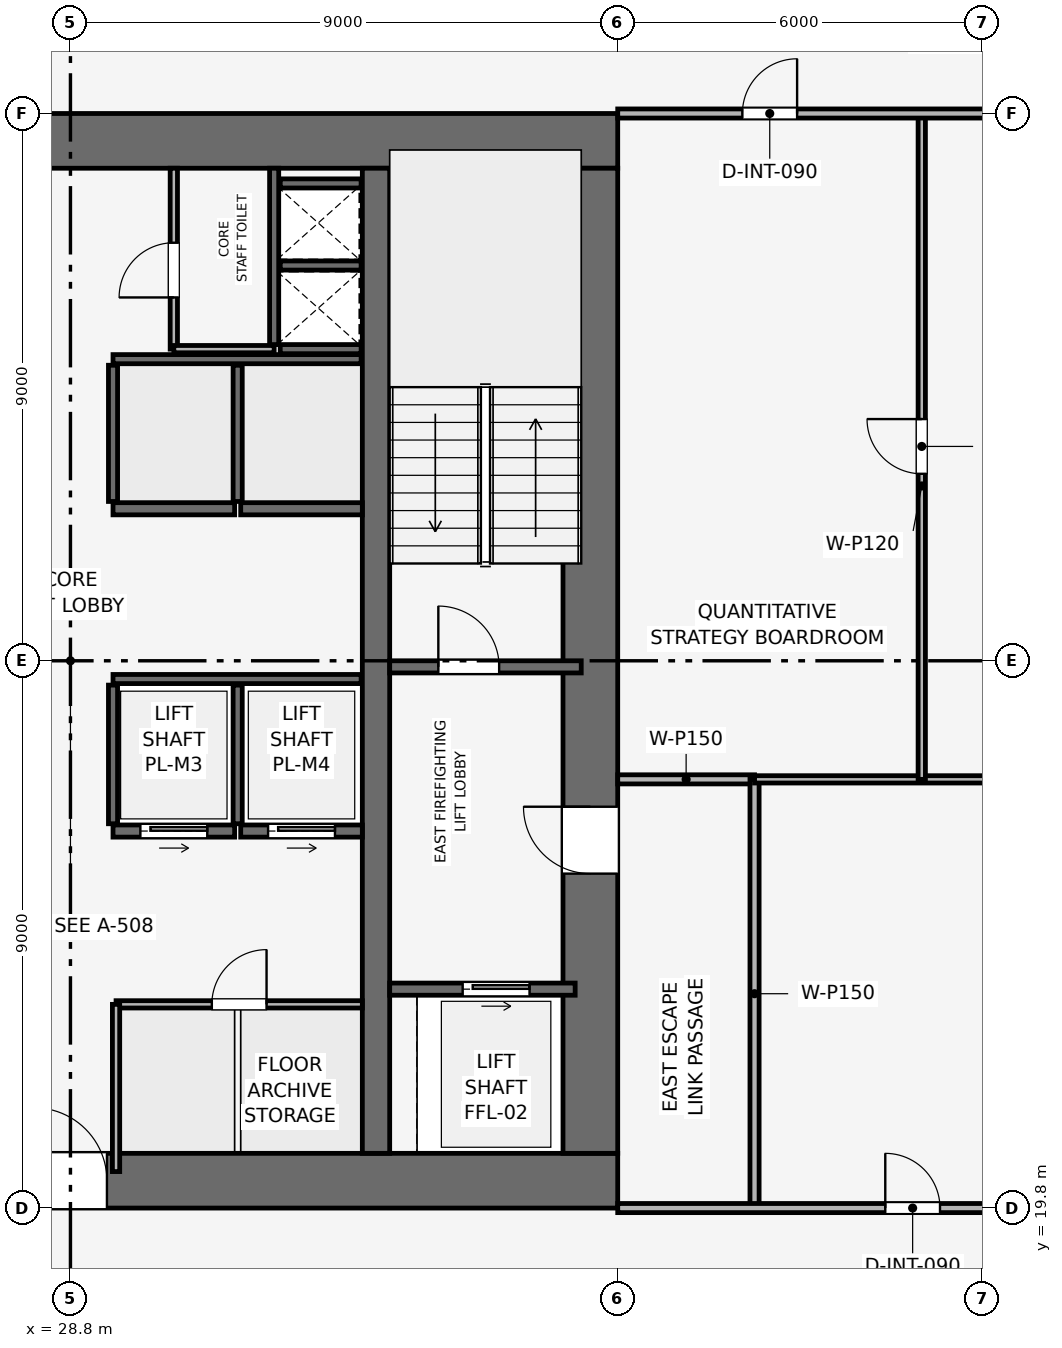
"""IFC4 building model, lengths in metres.
Left out: names, types, materials, properties, quantities, classifications, styles, units other than length and angle.
Written with IfcOpenShell. Run it as: python <this file> out.ifc"""

import sys

from ifc_helpers import new_model, si_unit, direction, frame, frame_2d, origin, place, context, subcontext, project, spatial, rectangle, extrude, element, fill, save


model = new_model("IFC4")
c1 = context("Model", 3, precision=1e-05, world=origin(), true_north=direction((0.0, 1.0)))
c2 = subcontext(c1, "Body", "Model", "MODEL_VIEW")
j1 = project(units=[si_unit("LENGTHUNIT", "METRE"), si_unit("PLANEANGLEUNIT", "RADIAN")], contexts=[c1])
p1 = place(None, origin())
s1 = spatial("IfcSite", under=j1, at=p1, CompositionType="ELEMENT")
p2 = place(p1, origin())
s2 = spatial("IfcBuilding", under=s1, at=p2, CompositionType="ELEMENT")
p3 = place(p2, frame((0.0, 0.0, 172.05)))
s3 = spatial("IfcBuildingStorey", under=s2, at=p3, CompositionType="ELEMENT", Elevation=172.05)
p4 = place(p3, frame((19.8, 20.25, 0.0), z_axis=(0.0, 0.0, 1.0), x_axis=(1.0, 0.0, 0.0)))
e1 = element("IfcWall", 1, at=p4, inside=s3, PredefinedType="SHEAR", context=c2, shape_type="SweptSolid", body=[
    extrude(rectangle(XDim=18.0, YDim=0.9, at=frame_2d((9.0, 0.0))), origin(), (0.0, 0.0, 1.0), 3.75),
])
p5 = place(p4, frame((8.4, 0.0, 0.0)))
e2 = element("IfcOpeningElement", 2, at=p5, cuts=e1, PredefinedType="OPENING", context=c2, shape_type="SweptSolid", body=[
    extrude(rectangle(XDim=1.2, YDim=2.2, at=frame_2d((0.6, 1.1))), frame((0.0, 0.46, 0.0), z_axis=(0.0, -1.0, 0.0), x_axis=(1.0, 0.0, 0.0)), (0.0, 0.0, 1.0), 0.92),
])
p6 = place(p3, frame((19.8, 37.35, 0.0), z_axis=(0.0, 0.0, 1.0), x_axis=(1.0, 0.0, 0.0)))
e3 = element("IfcWall", 3, at=p6, inside=s3, PredefinedType="SHEAR", context=c2, shape_type="SweptSolid", body=[
    extrude(rectangle(XDim=18.0, YDim=0.9, at=frame_2d((9.0, 0.0))), origin(), (0.0, 0.0, 1.0), 3.75),
])
p7 = place(p6, frame((7.05, 0.0, 0.0)))
e4 = element("IfcOpeningElement", 4, at=p7, cuts=e3, PredefinedType="OPENING", context=c2, shape_type="SweptSolid", body=[
    extrude(rectangle(XDim=1.1, YDim=2.15, at=frame_2d((0.55, 1.075))), frame((0.0, 0.46, 0.0), z_axis=(0.0, -1.0, 0.0), x_axis=(1.0, 0.0, 0.0)), (0.0, 0.0, 1.0), 0.92),
])
p8 = place(p3, frame((37.35, 20.7, 0.0), z_axis=(0.0, 0.0, 1.0), x_axis=(0.0, 1.0, 0.0)))
e5 = element("IfcWall", 5, at=p8, inside=s3, PredefinedType="SHEAR", context=c2, shape_type="SweptSolid", body=[
    extrude(rectangle(XDim=16.2, YDim=0.9, at=frame_2d((8.1, 0.0))), origin(), (0.0, 0.0, 1.0), 3.75),
])
p9 = place(p8, frame((4.6, 0.0, 0.0)))
e6 = element("IfcOpeningElement", 6, at=p9, cuts=e5, PredefinedType="OPENING", context=c2, shape_type="SweptSolid", body=[
    extrude(rectangle(XDim=1.1, YDim=2.15, at=frame_2d((0.55, 1.075))), frame((0.0, 0.46, 0.0), z_axis=(0.0, -1.0, 0.0), x_axis=(1.0, 0.0, 0.0)), (0.0, 0.0, 1.0), 0.92),
])
p10 = place(p3, frame((33.825, 20.7, 0.0), z_axis=(0.0, 0.0, 1.0), x_axis=(0.0, 1.0, 0.0)))
e7 = element("IfcWall", 7, at=p10, inside=s3, PredefinedType="SHEAR", context=c2, shape_type="SweptSolid", body=[
    extrude(rectangle(XDim=16.2, YDim=0.45, at=frame_2d((8.1, 0.0))), origin(), (0.0, 0.0, 1.0), 3.75),
])
p11 = place(p3, frame((34.05, 28.7, 0.0), z_axis=(0.0, 0.0, 1.0), x_axis=(1.0, 0.0, 0.0)))
e8 = element("IfcWall", 8, at=p11, inside=s3, PredefinedType="SHEAR", context=c2, shape_type="SweptSolid", body=[
    extrude(rectangle(XDim=3.15, YDim=0.2, at=frame_2d((1.575, 0.0))), origin(), (0.0, 0.0, 1.0), 3.495),
])
p12 = place(p11, frame((0.8, 0.0, 0.0)))
e9 = element("IfcOpeningElement", 9, at=p12, cuts=e8, PredefinedType="OPENING", context=c2, shape_type="SweptSolid", body=[
    extrude(rectangle(XDim=1.0, YDim=2.1, at=frame_2d((0.5, 1.05))), frame((0.0, 0.11, 0.0), z_axis=(0.0, -1.0, 0.0), x_axis=(1.0, 0.0, 0.0)), (0.0, 0.0, 1.0), 0.22),
])
p13 = place(p3, frame((32.15, 34.0, 0.0), z_axis=(0.0, 0.0, 1.0), x_axis=(0.0, 1.0, 0.0)))
e10 = element("IfcWall", 10, at=p13, inside=s3, PredefinedType="SHEAR", context=c2, shape_type="SweptSolid", body=[
    extrude(rectangle(XDim=2.9, YDim=0.15, at=frame_2d((1.45, 0.0))), origin(), (0.0, 0.0, 1.0), 3.495),
])
for number, where, z_axis, x_axis in (
    (11, (32.25, 33.925, 0.0), (0.0, 0.0, 1.0), (1.0, 0.0, 0.0)),
    (12, (32.25, 35.3, 0.0), (0.0, 0.0, 1.0), (1.0, 0.0, 0.0)),
):
    element("IfcWall", number, at=place(p3, frame(where, z_axis=z_axis, x_axis=x_axis)), inside=s3, PredefinedType="SHEAR", context=c2, shape_type="SweptSolid", body=[
        extrude(rectangle(XDim=1.33, YDim=0.15, at=frame_2d((0.665, 0.0))), origin(), (0.0, 0.0, 1.0), 3.495),
    ])
p14 = place(p3, frame((34.05, 23.4, 0.0), z_axis=(0.0, 0.0, 1.0), x_axis=(1.0, 0.0, 0.0)))
e13 = element("IfcWall", 13, at=p14, inside=s3, PredefinedType="SHEAR", context=c2, shape_type="SweptSolid", body=[
    extrude(rectangle(XDim=3.05, YDim=0.2, at=frame_2d((1.525, 0.0))), origin(), (0.0, 0.0, 1.0), 3.495),
])
p15 = place(p14, frame((1.2, 0.0, 0.0)))
e14 = element("IfcOpeningElement", 14, at=p15, cuts=e13, PredefinedType="OPENING", context=c2, shape_type="SweptSolid", body=[
    extrude(rectangle(XDim=1.1, YDim=2.15, at=frame_2d((0.55, 1.075))), frame((0.0, 0.11, 0.0), z_axis=(0.0, -1.0, 0.0), x_axis=(1.0, 0.0, 0.0)), (0.0, 0.0, 1.0), 0.22),
])
p16 = place(p3, frame((29.5, 26.0, 0.0), z_axis=(0.0, 0.0, 1.0), x_axis=(1.0, 0.0, 0.0)))
e15 = element("IfcWall", 15, at=p16, inside=s3, PredefinedType="SHEAR", context=c2, shape_type="SweptSolid", body=[
    extrude(rectangle(XDim=2.0, YDim=0.2, at=frame_2d((1.0, 0.0))), origin(), (0.0, 0.0, 1.0), 3.495),
])
p17 = place(p16, frame((0.45, 0.0, 0.0)))
e16 = element("IfcOpeningElement", 16, at=p17, cuts=e15, PredefinedType="OPENING", context=c2, shape_type="SweptSolid", body=[
    extrude(rectangle(XDim=1.1, YDim=2.15, at=frame_2d((0.55, 1.075))), frame((0.0, 0.11, 0.0), z_axis=(0.0, -1.0, 0.0), x_axis=(1.0, 0.0, 0.0)), (0.0, 0.0, 1.0), 0.22),
])
p18 = place(p3, frame((31.6, 26.0, 0.0), z_axis=(0.0, 0.0, 1.0), x_axis=(1.0, 0.0, 0.0)))
e17 = element("IfcWall", 17, at=p18, inside=s3, PredefinedType="SHEAR", context=c2, shape_type="SweptSolid", body=[
    extrude(rectangle(XDim=2.0, YDim=0.2, at=frame_2d((1.0, 0.0))), origin(), (0.0, 0.0, 1.0), 3.495),
])
p19 = place(p18, frame((0.45, 0.0, 0.0)))
e18 = element("IfcOpeningElement", 18, at=p19, cuts=e17, PredefinedType="OPENING", context=c2, shape_type="SweptSolid", body=[
    extrude(rectangle(XDim=1.1, YDim=2.15, at=frame_2d((0.55, 1.075))), frame((0.0, 0.11, 0.0), z_axis=(0.0, -1.0, 0.0), x_axis=(1.0, 0.0, 0.0)), (0.0, 0.0, 1.0), 0.22),
])
for number, where, z_axis, x_axis in (
    (19, (29.5, 31.3, 0.0), (0.0, 0.0, 1.0), (1.0, 0.0, 0.0)),
    (20, (31.6, 31.3, 0.0), (0.0, 0.0, 1.0), (1.0, 0.0, 0.0)),
):
    element("IfcWall", number, at=place(p3, frame(where, z_axis=z_axis, x_axis=x_axis)), inside=s3, PredefinedType="SHEAR", context=c2, shape_type="SweptSolid", body=[
        extrude(rectangle(XDim=2.0, YDim=0.2, at=frame_2d((1.0, 0.0))), origin(), (0.0, 0.0, 1.0), 3.495),
    ])
p20 = place(p3, frame((32.25, 36.65, 0.0), z_axis=(0.0, 0.0, 1.0), x_axis=(1.0, 0.0, 0.0)))
e21 = element("IfcWall", 21, at=p20, inside=s3, PredefinedType="SHEAR", context=c2, shape_type="SweptSolid", body=[
    extrude(rectangle(XDim=1.33, YDim=0.15, at=frame_2d((0.665, 0.0))), origin(), (0.0, 0.0, 1.0), 3.495),
])
p21 = place(p3, frame((29.5, 28.5, 0.0), z_axis=(0.0, 0.0, 1.0), x_axis=(1.0, 0.0, 0.0)))
e22 = element("IfcWall", 22, at=p21, inside=s3, PredefinedType="SHEAR", context=c2, shape_type="SweptSolid", body=[
    extrude(rectangle(XDim=4.08, YDim=0.15, at=frame_2d((2.04, 0.0))), origin(), (0.0, 0.0, 1.0), 3.495),
])
for number, where, z_axis, x_axis in (
    (23, (29.5, 26.12, 0.0), (0.0, 0.0, 1.0), (0.0, 1.0, 0.0)),
    (24, (31.55, 26.12, 0.0), (0.0, 0.0, 1.0), (0.0, 1.0, 0.0)),
):
    element("IfcWall", number, at=place(p3, frame(where, z_axis=z_axis, x_axis=x_axis)), inside=s3, PredefinedType="SHEAR", context=c2, shape_type="SweptSolid", body=[
        extrude(rectangle(XDim=2.28, YDim=0.15, at=frame_2d((1.14, 0.0))), origin(), (0.0, 0.0, 1.0), 3.495),
    ])
p22 = place(p3, frame((29.5, 33.76, 0.0), z_axis=(0.0, 0.0, 1.0), x_axis=(1.0, 0.0, 0.0)))
e25 = element("IfcWall", 25, at=p22, inside=s3, PredefinedType="SHEAR", context=c2, shape_type="SweptSolid", body=[
    extrude(rectangle(XDim=4.08, YDim=0.15, at=frame_2d((2.04, 0.0))), origin(), (0.0, 0.0, 1.0), 3.495),
])
for number, where, z_axis, x_axis in (
    (26, (29.5, 31.42, 0.0), (0.0, 0.0, 1.0), (0.0, 1.0, 0.0)),
    (27, (31.55, 31.42, 0.0), (0.0, 0.0, 1.0), (0.0, 1.0, 0.0)),
):
    element("IfcWall", number, at=place(p3, frame(where, z_axis=z_axis, x_axis=x_axis)), inside=s3, PredefinedType="SHEAR", context=c2, shape_type="SweptSolid", body=[
        extrude(rectangle(XDim=2.24, YDim=0.15, at=frame_2d((1.12, 0.0))), origin(), (0.0, 0.0, 1.0), 3.495),
    ])
p23 = place(p3, frame((30.5, 33.925, 0.0), z_axis=(0.0, 0.0, 1.0), x_axis=(0.0, 1.0, 0.0)))
e28 = element("IfcWall", 28, at=p23, inside=s3, PredefinedType="PARTITIONING", context=c2, shape_type="SweptSolid", body=[
    extrude(rectangle(XDim=2.975, YDim=0.12, at=frame_2d((1.487, 0.0))), origin(), (0.0, 0.0, 1.0), 3.495),
])
p24 = place(p23, frame((0.85, 0.0, 0.0)))
e29 = element("IfcOpeningElement", 29, at=p24, cuts=e28, PredefinedType="OPENING", context=c2, shape_type="SweptSolid", body=[
    extrude(rectangle(XDim=0.9, YDim=2.1, at=frame_2d((0.45, 1.05))), frame((0.0, 0.07, 0.0), z_axis=(0.0, -1.0, 0.0), x_axis=(1.0, 0.0, 0.0)), (0.0, 0.0, 1.0), 0.14),
])
p25 = place(p3, frame((30.5, 33.925, 0.0), z_axis=(0.0, 0.0, 1.0), x_axis=(1.0, 0.0, 0.0)))
e30 = element("IfcWall", 30, at=p25, inside=s3, PredefinedType="PARTITIONING", context=c2, shape_type="SweptSolid", body=[
    extrude(rectangle(XDim=1.65, YDim=0.12, at=frame_2d((0.825, 0.0))), origin(), (0.0, 0.0, 1.0), 3.495),
])
p26 = place(p3, frame((29.55, 23.15, 0.0), z_axis=(0.0, 0.0, 1.0), x_axis=(1.0, 0.0, 0.0)))
e31 = element("IfcWall", 31, at=p26, inside=s3, PredefinedType="PARTITIONING", context=c2, shape_type="SweptSolid", body=[
    extrude(rectangle(XDim=4.05, YDim=0.12, at=frame_2d((2.025, 0.0))), origin(), (0.0, 0.0, 1.0), 3.495),
])
p27 = place(p26, frame((1.575, 0.0, 0.0)))
e32 = element("IfcOpeningElement", 32, at=p27, cuts=e31, PredefinedType="OPENING", context=c2, shape_type="SweptSolid", body=[
    extrude(rectangle(XDim=0.9, YDim=2.1, at=frame_2d((0.45, 1.05))), frame((0.0, 0.07, 0.0), z_axis=(0.0, -1.0, 0.0), x_axis=(1.0, 0.0, 0.0)), (0.0, 0.0, 1.0), 0.14),
])
p28 = place(p3, frame((29.55, 20.4, 0.0), z_axis=(0.0, 0.0, 1.0), x_axis=(0.0, 1.0, 0.0)))
e33 = element("IfcWall", 33, at=p28, inside=s3, PredefinedType="PARTITIONING", context=c2, shape_type="SweptSolid", body=[
    extrude(rectangle(XDim=2.75, YDim=0.12, at=frame_2d((1.375, 0.0))), origin(), (0.0, 0.0, 1.0), 3.495),
])
p29 = place(p3, frame((37.8, 26.85, 0.0), z_axis=(0.0, 0.0, 1.0), x_axis=(1.0, 0.0, 0.0)))
e34 = element("IfcWall", 34, at=p29, inside=s3, PredefinedType="PARTITIONING", context=c2, shape_type="SweptSolid", body=[
    extrude(rectangle(XDim=2.25, YDim=0.15, at=frame_2d((1.125, 0.0))), origin(), (0.0, 0.0, 1.0), 3.495),
])
p30 = place(p3, frame((40.05, 19.8, 0.0), z_axis=(0.0, 0.0, 1.0), x_axis=(0.0, 1.0, 0.0)))
e35 = element("IfcWall", 35, at=p30, inside=s3, PredefinedType="PARTITIONING", context=c2, shape_type="SweptSolid", body=[
    extrude(rectangle(XDim=7.05, YDim=0.15, at=frame_2d((3.525, 0.0))), origin(), (0.0, 0.0, 1.0), 3.03),
])
p31 = place(p3, frame((40.05, 26.85, 0.0), z_axis=(0.0, 0.0, 1.0), x_axis=(1.0, 0.0, 0.0)))
e36 = element("IfcWall", 36, at=p31, inside=s3, PredefinedType="PARTITIONING", context=c2, shape_type="SweptSolid", body=[
    extrude(rectangle(XDim=12.92, YDim=0.12, at=frame_2d((6.46, 0.0))), origin(), (0.0, 0.0, 1.0), 2.98),
])
p32 = place(p3, frame((42.8, 26.85, 0.0), z_axis=(0.0, 0.0, 1.0), x_axis=(0.0, 1.0, 0.0)))
e37 = element("IfcWall", 37, at=p32, inside=s3, PredefinedType="PARTITIONING", context=c2, shape_type="SweptSolid", body=[
    extrude(rectangle(XDim=10.95, YDim=0.12, at=frame_2d((5.475, 0.0))), origin(), (0.0, 0.0, 1.0), 3.03),
])
p33 = place(p32, frame((5.025, 0.0, 0.0)))
e38 = element("IfcOpeningElement", 38, at=p33, cuts=e37, PredefinedType="OPENING", context=c2, shape_type="SweptSolid", body=[
    extrude(rectangle(XDim=0.9, YDim=2.1, at=frame_2d((0.45, 1.05))), frame((0.0, 0.07, 0.0), z_axis=(0.0, -1.0, 0.0), x_axis=(1.0, 0.0, 0.0)), (0.0, 0.0, 1.0), 0.14),
])
p34 = place(p3, frame((37.8, 19.8, 0.0), z_axis=(0.0, 0.0, 1.0), x_axis=(1.0, 0.0, 0.0)))
e39 = element("IfcWall", 39, at=p34, inside=s3, PredefinedType="PARTITIONING", context=c2, shape_type="SweptSolid", body=[
    extrude(rectangle(XDim=15.17, YDim=0.15, at=frame_2d((7.585, 0.0))), origin(), (0.0, 0.0, 1.0), 2.98),
])
p35 = place(p34, frame((4.4, 0.0, 0.0)))
e40 = element("IfcOpeningElement", 40, at=p35, cuts=e39, PredefinedType="OPENING", context=c2, shape_type="SweptSolid", body=[
    extrude(rectangle(XDim=0.9, YDim=2.1, at=frame_2d((0.45, 1.05))), frame((0.0, 0.085, 0.0), z_axis=(0.0, -1.0, 0.0), x_axis=(1.0, 0.0, 0.0)), (0.0, 0.0, 1.0), 0.17),
])
p36 = place(p3, frame((37.8, 37.8, 0.0), z_axis=(0.0, 0.0, 1.0), x_axis=(1.0, 0.0, 0.0)))
e41 = element("IfcWall", 41, at=p36, inside=s3, PredefinedType="PARTITIONING", context=c2, shape_type="SweptSolid", body=[
    extrude(rectangle(XDim=15.17, YDim=0.15, at=frame_2d((7.585, 0.0))), origin(), (0.0, 0.0, 1.0), 2.98),
])
p37 = place(p36, frame((2.05, 0.0, 0.0)))
e42 = element("IfcOpeningElement", 42, at=p37, cuts=e41, PredefinedType="OPENING", context=c2, shape_type="SweptSolid", body=[
    extrude(rectangle(XDim=0.9, YDim=2.1, at=frame_2d((0.45, 1.05))), frame((0.0, 0.085, 0.0), z_axis=(0.0, -1.0, 0.0), x_axis=(1.0, 0.0, 0.0)), (0.0, 0.0, 1.0), 0.17),
])
p38 = place(p12, origin())
e43 = element("IfcDoor", 43, at=p38, inside=s3, OperationType="SINGLE_SWING_LEFT", PredefinedType="DOOR", context=c2, shape_type="SweptSolid", body=[
    extrude(rectangle(XDim=1.0, YDim=2.1, at=frame_2d((0.5, 1.05))), frame((0.0, 0.025, 0.0), z_axis=(0.0, -1.0, 0.0), x_axis=(1.0, 0.0, 0.0)), (0.0, 0.0, 1.0), 0.05),
])
fill(e9, e43)
p39 = place(p15, origin())
e44 = element("IfcDoor", 44, at=p39, inside=s3, OperationType="SLIDING_TO_RIGHT", PredefinedType="DOOR", context=c2, shape_type="SweptSolid", body=[
    extrude(rectangle(XDim=1.1, YDim=2.15, at=frame_2d((0.55, 1.075))), frame((0.0, 0.025, 0.0), z_axis=(0.0, -1.0, 0.0), x_axis=(1.0, 0.0, 0.0)), (0.0, 0.0, 1.0), 0.05),
])
fill(e14, e44)
p40 = place(p17, origin())
e45 = element("IfcDoor", 45, at=p40, inside=s3, OperationType="SLIDING_TO_RIGHT", PredefinedType="DOOR", context=c2, shape_type="SweptSolid", body=[
    extrude(rectangle(XDim=1.1, YDim=2.15, at=frame_2d((0.55, 1.075))), frame((0.0, 0.025, 0.0), z_axis=(0.0, -1.0, 0.0), x_axis=(1.0, 0.0, 0.0)), (0.0, 0.0, 1.0), 0.05),
])
fill(e16, e45)
p41 = place(p19, origin())
e46 = element("IfcDoor", 46, at=p41, inside=s3, OperationType="SLIDING_TO_RIGHT", PredefinedType="DOOR", context=c2, shape_type="SweptSolid", body=[
    extrude(rectangle(XDim=1.1, YDim=2.15, at=frame_2d((0.55, 1.075))), frame((0.0, 0.025, 0.0), z_axis=(0.0, -1.0, 0.0), x_axis=(1.0, 0.0, 0.0)), (0.0, 0.0, 1.0), 0.05),
])
fill(e18, e46)
p42 = place(p24, origin())
e47 = element("IfcDoor", 47, at=p42, inside=s3, OperationType="SINGLE_SWING_LEFT", PredefinedType="DOOR", context=c2, shape_type="SweptSolid", body=[
    extrude(rectangle(XDim=0.9, YDim=2.1, at=frame_2d((0.45, 1.05))), frame((0.0, 0.025, 0.0), z_axis=(0.0, -1.0, 0.0), x_axis=(1.0, 0.0, 0.0)), (0.0, 0.0, 1.0), 0.05),
])
fill(e29, e47)
p43 = place(p27, origin())
e48 = element("IfcDoor", 48, at=p43, inside=s3, OperationType="SINGLE_SWING_RIGHT", PredefinedType="DOOR", context=c2, shape_type="SweptSolid", body=[
    extrude(rectangle(XDim=0.9, YDim=2.1, at=frame_2d((0.45, 1.05))), frame((0.0, 0.025, 0.0), z_axis=(0.0, -1.0, 0.0), x_axis=(1.0, 0.0, 0.0)), (0.0, 0.0, 1.0), 0.05),
])
fill(e32, e48)
p44 = place(p33, origin())
e49 = element("IfcDoor", 49, at=p44, inside=s3, OperationType="SINGLE_SWING_RIGHT", PredefinedType="DOOR", context=c2, shape_type="SweptSolid", body=[
    extrude(rectangle(XDim=0.9, YDim=2.1, at=frame_2d((0.45, 1.05))), frame((0.0, 0.025, 0.0), z_axis=(0.0, -1.0, 0.0), x_axis=(1.0, 0.0, 0.0)), (0.0, 0.0, 1.0), 0.05),
])
fill(e38, e49)
p45 = place(p35, origin())
e50 = element("IfcDoor", 50, at=p45, inside=s3, OperationType="SINGLE_SWING_LEFT", PredefinedType="DOOR", context=c2, shape_type="SweptSolid", body=[
    extrude(rectangle(XDim=0.9, YDim=2.1, at=frame_2d((0.45, 1.05))), frame((0.0, 0.025, 0.0), z_axis=(0.0, -1.0, 0.0), x_axis=(1.0, 0.0, 0.0)), (0.0, 0.0, 1.0), 0.05),
])
fill(e40, e50)
p46 = place(p37, origin())
e51 = element("IfcDoor", 51, at=p46, inside=s3, OperationType="SINGLE_SWING_RIGHT", PredefinedType="DOOR", context=c2, shape_type="SweptSolid", body=[
    extrude(rectangle(XDim=0.9, YDim=2.1, at=frame_2d((0.45, 1.05))), frame((0.0, 0.025, 0.0), z_axis=(0.0, -1.0, 0.0), x_axis=(1.0, 0.0, 0.0)), (0.0, 0.0, 1.0), 0.05),
])
fill(e42, e51)
p47 = place(p9, origin())
e52 = element("IfcDoor", 52, at=p47, inside=s3, OperationType="SINGLE_SWING_RIGHT", PredefinedType="DOOR", context=c2, shape_type="SweptSolid", body=[
    extrude(rectangle(XDim=1.1, YDim=2.15, at=frame_2d((0.55, 1.075))), frame((0.0, 0.025, 0.0), z_axis=(0.0, -1.0, 0.0), x_axis=(1.0, 0.0, 0.0)), (0.0, 0.0, 1.0), 0.05),
])
fill(e6, e52)
p48 = place(p5, origin())
e53 = element("IfcDoor", 53, at=p48, inside=s3, OperationType="SINGLE_SWING_LEFT", PredefinedType="DOOR", context=c2, shape_type="SweptSolid", body=[
    extrude(rectangle(XDim=1.2, YDim=2.2, at=frame_2d((0.6, 1.1))), frame((0.0, 0.025, 0.0), z_axis=(0.0, -1.0, 0.0), x_axis=(1.0, 0.0, 0.0)), (0.0, 0.0, 1.0), 0.05),
])
fill(e2, e53)
save(model, sys.argv[1])
